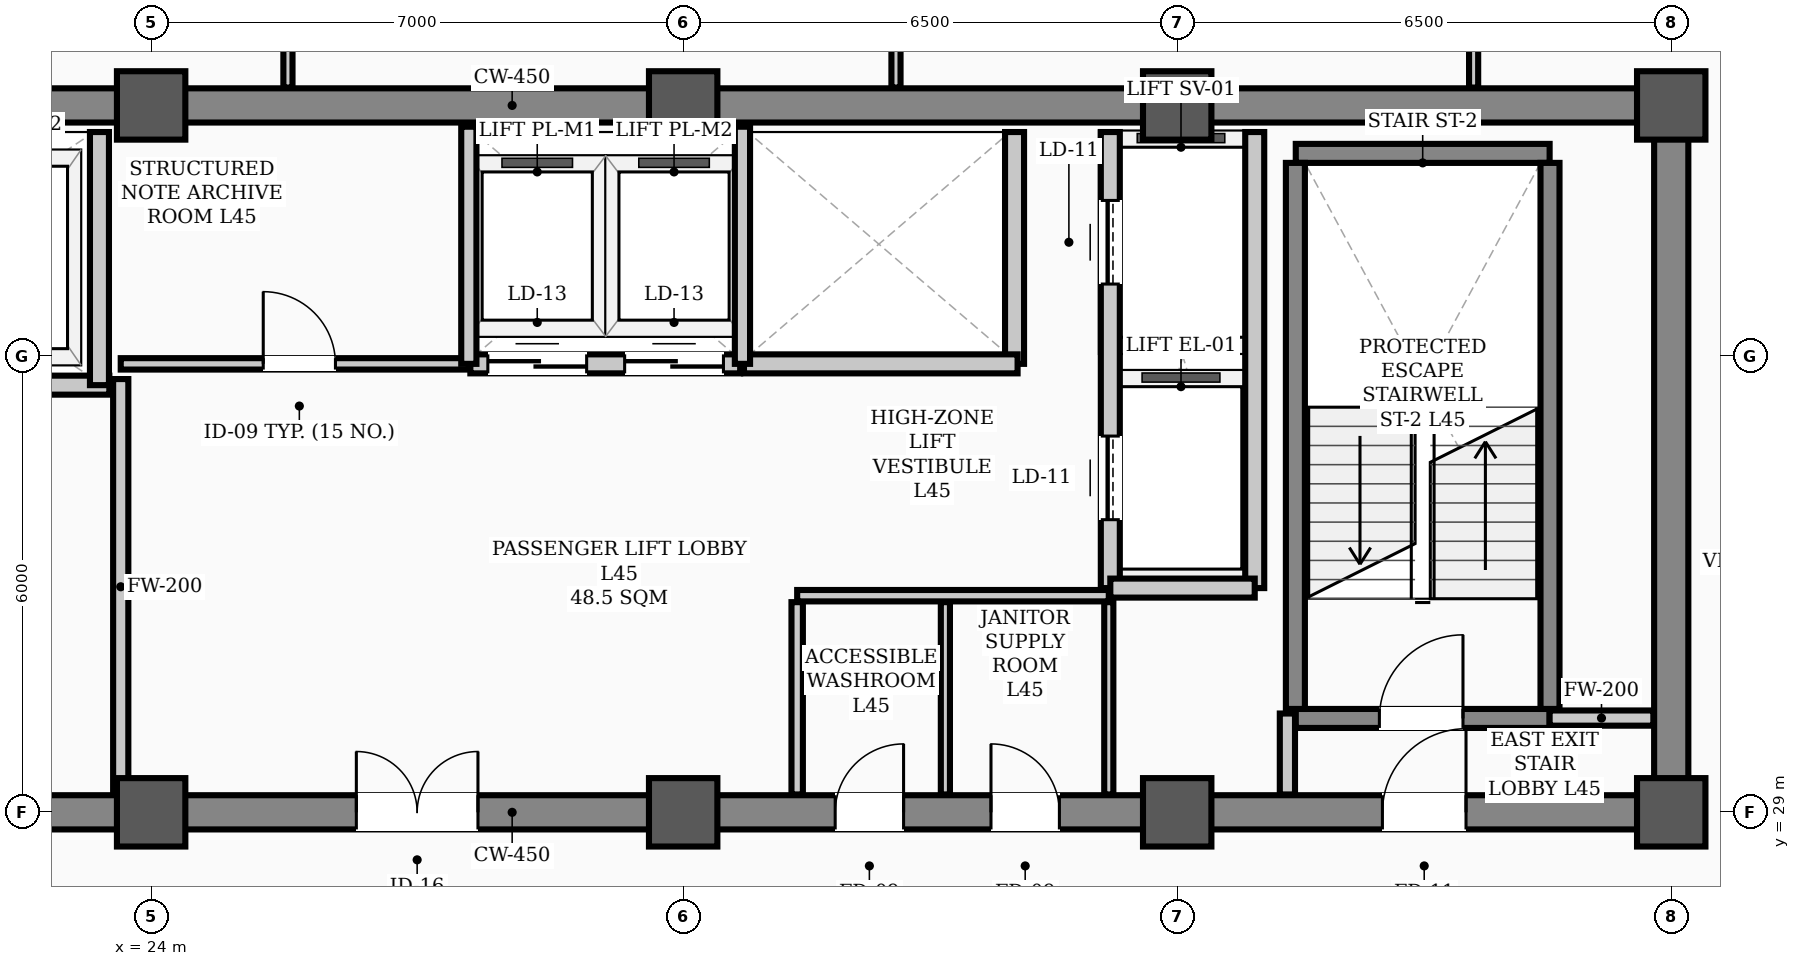
"""IFC4 building model, lengths in metres.
Left out: names, types, materials, properties, quantities, classifications, styles, units other than length and angle.
Written with IfcOpenShell. Run it as: python <this file> out.ifc"""

import sys

from ifc_helpers import new_model, si_unit, direction, frame, frame_2d, origin, origin_2d, place, context, subcontext, project, spatial, rectangle, hollow_rectangle, extrude, element, fill, save


model = new_model("IFC4")
c1 = context("Model", 3, precision=1e-05, world=origin(), true_north=direction((0.0, 1.0)))
c2 = subcontext(c1, "Body", "Model", "MODEL_VIEW")
j1 = project(units=[si_unit("LENGTHUNIT", "METRE"), si_unit("PLANEANGLEUNIT", "RADIAN")], contexts=[c1])
p1 = place(None, origin())
s1 = spatial("IfcSite", under=j1, at=p1, CompositionType="ELEMENT")
p2 = place(p1, origin())
s2 = spatial("IfcBuilding", under=s1, at=p2, CompositionType="ELEMENT")
p3 = place(p2, frame((0.0, 0.0, 181.2)))
s3 = spatial("IfcBuildingStorey", under=s2, at=p3, CompositionType="ELEMENT", Elevation=181.2)
for number, where, z_axis, x_axis in (
    (1, (24.0, 29.0, 0.0), (0.0, 0.0, 1.0), (1.0, 0.0, 0.0)),
    (2, (24.0, 38.3, 0.0), (0.0, 0.0, 1.0), (1.0, 0.0, 0.0)),
    (3, (31.0, 29.0, 0.0), (0.0, 0.0, 1.0), (1.0, 0.0, 0.0)),
    (4, (31.0, 38.3, 0.0), (0.0, 0.0, 1.0), (1.0, 0.0, 0.0)),
    (5, (37.5, 29.0, 0.0), (0.0, 0.0, 1.0), (1.0, 0.0, 0.0)),
    (6, (37.5, 38.3, 0.0), (0.0, 0.0, 1.0), (1.0, 0.0, 0.0)),
    (7, (44.0, 29.0, 0.0), (0.0, 0.0, 1.0), (1.0, 0.0, 0.0)),
    (8, (44.0, 38.3, 0.0), (0.0, 0.0, 1.0), (1.0, 0.0, 0.0)),
):
    element("IfcColumn", number, at=place(p3, frame(where, z_axis=z_axis, x_axis=x_axis)), inside=s3, PredefinedType="COLUMN", context=c2, shape_type="SweptSolid", body=[
        extrude(hollow_rectangle(XDim=0.9, YDim=0.9, WallThickness=0.035, InnerFilletRadius=0.017, OuterFilletRadius=0.052, at=origin_2d()), origin(), (0.0, 0.0, 1.0), 3.9),
    ])
p4 = place(p3, frame((13.5, 29.0, 0.0), z_axis=(0.0, 0.0, 1.0), x_axis=(1.0, 0.0, 0.0)))
e9 = element("IfcWall", 9, at=p4, inside=s3, PredefinedType="SHEAR", context=c2, shape_type="SweptSolid", body=[
    extrude(rectangle(XDim=30.5, YDim=0.45, at=frame_2d((15.25, 0.0))), origin(), (0.0, 0.0, 1.0), 3.72),
])
p5 = place(p4, frame((1.75, 0.0, 0.0)))
e10 = element("IfcOpeningElement", 10, at=p5, cuts=e9, PredefinedType="OPENING", context=c2, shape_type="SweptSolid", body=[
    extrude(rectangle(XDim=1.1, YDim=2.08, at=frame_2d((0.55, 1.04))), frame((0.0, 0.235, 0.0), z_axis=(0.0, -1.0, 0.0), x_axis=(1.0, 0.0, 0.0)), (0.0, 0.0, 1.0), 0.47),
])
p6 = place(p4, frame((26.7, 0.0, 0.0)))
e11 = element("IfcOpeningElement", 11, at=p6, cuts=e9, PredefinedType="OPENING", context=c2, shape_type="SweptSolid", body=[
    extrude(rectangle(XDim=1.1, YDim=2.08, at=frame_2d((0.55, 1.04))), frame((0.0, 0.235, 0.0), z_axis=(0.0, -1.0, 0.0), x_axis=(1.0, 0.0, 0.0)), (0.0, 0.0, 1.0), 0.47),
])
p7 = place(p4, frame((6.8, 0.0, 0.0)))
e12 = element("IfcOpeningElement", 12, at=p7, cuts=e9, PredefinedType="OPENING", context=c2, shape_type="SweptSolid", body=[
    extrude(rectangle(XDim=1.1, YDim=2.08, at=frame_2d((0.55, 1.04))), frame((0.0, 0.235, 0.0), z_axis=(0.0, -1.0, 0.0), x_axis=(1.0, 0.0, 0.0)), (0.0, 0.0, 1.0), 0.47),
])
p8 = place(p4, frame((13.2, 0.0, 0.0)))
e13 = element("IfcOpeningElement", 13, at=p8, cuts=e9, PredefinedType="OPENING", context=c2, shape_type="SweptSolid", body=[
    extrude(rectangle(XDim=1.6, YDim=2.08, at=frame_2d((0.8, 1.04))), frame((0.0, 0.235, 0.0), z_axis=(0.0, -1.0, 0.0), x_axis=(1.0, 0.0, 0.0)), (0.0, 0.0, 1.0), 0.47),
])
p9 = place(p4, frame((19.5, 0.0, 0.0)))
e14 = element("IfcOpeningElement", 14, at=p9, cuts=e9, PredefinedType="OPENING", context=c2, shape_type="SweptSolid", body=[
    extrude(rectangle(XDim=0.9, YDim=2.08, at=frame_2d((0.45, 1.04))), frame((0.0, 0.235, 0.0), z_axis=(0.0, -1.0, 0.0), x_axis=(1.0, 0.0, 0.0)), (0.0, 0.0, 1.0), 0.47),
])
p10 = place(p4, frame((21.55, 0.0, 0.0)))
e15 = element("IfcOpeningElement", 15, at=p10, cuts=e9, PredefinedType="OPENING", context=c2, shape_type="SweptSolid", body=[
    extrude(rectangle(XDim=0.9, YDim=2.08, at=frame_2d((0.45, 1.04))), frame((0.0, 0.235, 0.0), z_axis=(0.0, -1.0, 0.0), x_axis=(1.0, 0.0, 0.0)), (0.0, 0.0, 1.0), 0.47),
])
p11 = place(p3, frame((13.5, 38.3, 0.0), z_axis=(0.0, 0.0, 1.0), x_axis=(1.0, 0.0, 0.0)))
e16 = element("IfcWall", 16, at=p11, inside=s3, PredefinedType="SHEAR", context=c2, shape_type="SweptSolid", body=[
    extrude(rectangle(XDim=30.5, YDim=0.45, at=frame_2d((15.25, 0.0))), origin(), (0.0, 0.0, 1.0), 3.72),
])
p12 = place(p3, frame((44.0, 29.35, 0.0), z_axis=(0.0, 0.0, 1.0), x_axis=(0.0, 1.0, 0.0)))
e17 = element("IfcWall", 17, at=p12, inside=s3, PredefinedType="SHEAR", context=c2, shape_type="SweptSolid", body=[
    extrude(rectangle(XDim=8.6, YDim=0.45, at=frame_2d((4.3, 0.0))), origin(), (0.0, 0.0, 1.0), 3.72),
])
p13 = place(p3, frame((39.06, 30.235, 0.0), z_axis=(0.0, 0.0, 1.0), x_axis=(1.0, 0.0, 0.0)))
e18 = element("IfcWall", 18, at=p13, inside=s3, PredefinedType="STANDARD", context=c2, shape_type="SweptSolid", body=[
    extrude(rectangle(XDim=3.34, YDim=0.25, at=frame_2d((1.67, 0.0))), origin(), (0.0, 0.0, 1.0), 3.72),
])
p14 = place(p13, frame((1.1, 0.0, 0.0)))
e19 = element("IfcOpeningElement", 19, at=p14, cuts=e18, PredefinedType="OPENING", context=c2, shape_type="SweptSolid", body=[
    extrude(rectangle(XDim=1.1, YDim=2.08, at=frame_2d((0.55, 1.04))), frame((0.0, 0.135, 0.0), z_axis=(0.0, -1.0, 0.0), x_axis=(1.0, 0.0, 0.0)), (0.0, 0.0, 1.0), 0.27),
])
p15 = place(p3, frame((39.06, 37.669, 0.0), z_axis=(0.0, 0.0, 1.0), x_axis=(1.0, 0.0, 0.0)))
e20 = element("IfcWall", 20, at=p15, inside=s3, PredefinedType="STANDARD", context=c2, shape_type="SweptSolid", body=[
    extrude(rectangle(XDim=3.34, YDim=0.25, at=frame_2d((1.67, 0.0))), origin(), (0.0, 0.0, 1.0), 3.72),
])
for number, where, z_axis, x_axis in (
    (21, (39.055, 30.36, 0.0), (0.0, 0.0, 1.0), (0.0, 1.0, 0.0)),
    (22, (42.405, 30.36, 0.0), (0.0, 0.0, 1.0), (0.0, 1.0, 0.0)),
):
    element("IfcWall", number, at=place(p3, frame(where, z_axis=z_axis, x_axis=x_axis)), inside=s3, PredefinedType="STANDARD", context=c2, shape_type="SweptSolid", body=[
        extrude(rectangle(XDim=7.184, YDim=0.25, at=frame_2d((3.592, 0.0))), origin(), (0.0, 0.0, 1.0), 3.72),
    ])
p16 = place(p3, frame((18.1, 34.62, 0.0), z_axis=(0.0, 0.0, 1.0), x_axis=(1.0, 0.0, 0.0)))
e23 = element("IfcWall", 23, at=p16, inside=s3, PredefinedType="STANDARD", context=c2, shape_type="SweptSolid", body=[
    extrude(rectangle(XDim=5.35, YDim=0.25, at=frame_2d((2.675, 0.0))), origin(), (0.0, 0.0, 1.0), 3.72),
])
p17 = place(p16, frame((0.85, 0.0, 0.0)))
e24 = element("IfcOpeningElement", 24, at=p17, cuts=e23, PredefinedType="OPENING", context=c2, shape_type="SweptSolid", body=[
    extrude(rectangle(XDim=1.1, YDim=2.08, at=frame_2d((0.55, 1.04))), frame((0.0, 0.135, 0.0), z_axis=(0.0, -1.0, 0.0), x_axis=(1.0, 0.0, 0.0)), (0.0, 0.0, 1.0), 0.27),
])
p18 = place(p16, frame((3.45, 0.0, 0.0)))
e25 = element("IfcOpeningElement", 25, at=p18, cuts=e23, PredefinedType="OPENING", context=c2, shape_type="SweptSolid", body=[
    extrude(rectangle(XDim=1.1, YDim=2.08, at=frame_2d((0.55, 1.04))), frame((0.0, 0.135, 0.0), z_axis=(0.0, -1.0, 0.0), x_axis=(1.0, 0.0, 0.0)), (0.0, 0.0, 1.0), 0.27),
])
p19 = place(p3, frame((36.62, 31.95, 0.0), z_axis=(0.0, 0.0, 1.0), x_axis=(0.0, 1.0, 0.0)))
e26 = element("IfcWall", 26, at=p19, inside=s3, PredefinedType="STANDARD", context=c2, shape_type="SweptSolid", body=[
    extrude(rectangle(XDim=6.0, YDim=0.25, at=frame_2d((3.0, 0.0))), origin(), (0.0, 0.0, 1.0), 3.35),
])
p20 = place(p19, frame((0.9, 0.0, 0.0)))
e27 = element("IfcOpeningElement", 27, at=p20, cuts=e26, PredefinedType="OPENING", context=c2, shape_type="SweptSolid", body=[
    extrude(rectangle(XDim=1.1, YDim=2.08, at=frame_2d((0.55, 1.04))), frame((0.0, 0.135, 0.0), z_axis=(0.0, -1.0, 0.0), x_axis=(1.0, 0.0, 0.0)), (0.0, 0.0, 1.0), 0.27),
])
p21 = place(p19, frame((4.0, 0.0, 0.0)))
e28 = element("IfcOpeningElement", 28, at=p21, cuts=e26, PredefinedType="OPENING", context=c2, shape_type="SweptSolid", body=[
    extrude(rectangle(XDim=1.1, YDim=2.08, at=frame_2d((0.55, 1.04))), frame((0.0, 0.135, 0.0), z_axis=(0.0, -1.0, 0.0), x_axis=(1.0, 0.0, 0.0)), (0.0, 0.0, 1.0), 0.27),
])
p22 = place(p3, frame((38.52, 31.95, 0.0), z_axis=(0.0, 0.0, 1.0), x_axis=(0.0, 1.0, 0.0)))
e29 = element("IfcWall", 29, at=p22, inside=s3, PredefinedType="STANDARD", context=c2, shape_type="SweptSolid", body=[
    extrude(rectangle(XDim=6.0, YDim=0.25, at=frame_2d((3.0, 0.0))), origin(), (0.0, 0.0, 1.0), 3.35),
])
p23 = place(p3, frame((36.62, 31.95, 0.0), z_axis=(0.0, 0.0, 1.0), x_axis=(1.0, 0.0, 0.0)))
e30 = element("IfcWall", 30, at=p23, inside=s3, PredefinedType="STANDARD", context=c2, shape_type="SweptSolid", body=[
    extrude(rectangle(XDim=1.9, YDim=0.25, at=frame_2d((0.95, 0.0))), origin(), (0.0, 0.0, 1.0), 3.48),
])
p24 = place(p3, frame((23.32, 34.62, 0.0), z_axis=(0.0, 0.0, 1.0), x_axis=(0.0, 1.0, 0.0)))
e31 = element("IfcWall", 31, at=p24, inside=s3, PredefinedType="STANDARD", context=c2, shape_type="SweptSolid", body=[
    extrude(rectangle(XDim=3.33, YDim=0.25, at=frame_2d((1.665, 0.0))), origin(), (0.0, 0.0, 1.0), 3.35),
])
p25 = place(p3, frame((35.36, 34.9, 0.0), z_axis=(0.0, 0.0, 1.0), x_axis=(0.0, 1.0, 0.0)))
e32 = element("IfcWall", 32, at=p25, inside=s3, PredefinedType="STANDARD", context=c2, shape_type="SweptSolid", body=[
    extrude(rectangle(XDim=3.05, YDim=0.25, at=frame_2d((1.525, 0.0))), origin(), (0.0, 0.0, 1.0), 3.35),
])
p26 = place(p3, frame((28.2, 34.9, 0.0), z_axis=(0.0, 0.0, 1.0), x_axis=(1.0, 0.0, 0.0)))
e33 = element("IfcWall", 33, at=p26, inside=s3, PredefinedType="STANDARD", context=c2, shape_type="SweptSolid", body=[
    extrude(rectangle(XDim=3.55, YDim=0.25, at=frame_2d((1.775, 0.0))), origin(), (0.0, 0.0, 1.0), 3.72),
])
p27 = place(p26, frame((0.23, 0.0, 0.0)))
e34 = element("IfcOpeningElement", 34, at=p27, cuts=e33, PredefinedType="OPENING", context=c2, shape_type="SweptSolid", body=[
    extrude(rectangle(XDim=1.3, YDim=2.08, at=frame_2d((0.65, 1.04))), frame((0.0, 0.135, 0.0), z_axis=(0.0, -1.0, 0.0), x_axis=(1.0, 0.0, 0.0)), (0.0, 0.0, 1.0), 0.27),
])
p28 = place(p26, frame((2.03, 0.0, 0.0)))
e35 = element("IfcOpeningElement", 35, at=p28, cuts=e33, PredefinedType="OPENING", context=c2, shape_type="SweptSolid", body=[
    extrude(rectangle(XDim=1.3, YDim=2.08, at=frame_2d((0.65, 1.04))), frame((0.0, 0.135, 0.0), z_axis=(0.0, -1.0, 0.0), x_axis=(1.0, 0.0, 0.0)), (0.0, 0.0, 1.0), 0.27),
])
p29 = place(p3, frame((31.8, 34.9, 0.0), z_axis=(0.0, 0.0, 1.0), x_axis=(1.0, 0.0, 0.0)))
e36 = element("IfcWall", 36, at=p29, inside=s3, PredefinedType="STANDARD", context=c2, shape_type="SweptSolid", body=[
    extrude(rectangle(XDim=3.6, YDim=0.25, at=frame_2d((1.8, 0.0))), origin(), (0.0, 0.0, 1.0), 3.72),
])
p30 = place(p3, frame((42.4, 30.24, 0.0), z_axis=(0.0, 0.0, 1.0), x_axis=(1.0, 0.0, 0.0)))
e37 = element("IfcWall", 37, at=p30, inside=s3, PredefinedType="STANDARD", context=c2, shape_type="SweptSolid", body=[
    extrude(rectangle(XDim=1.365, YDim=0.2, at=frame_2d((0.683, 0.0))), origin(), (0.0, 0.0, 1.0), 3.2),
])
p31 = place(p3, frame((23.6, 34.9, 0.0), z_axis=(0.0, 0.0, 1.0), x_axis=(1.0, 0.0, 0.0)))
e38 = element("IfcWall", 38, at=p31, inside=s3, PredefinedType="PARTITIONING", context=c2, shape_type="SweptSolid", body=[
    extrude(rectangle(XDim=4.58, YDim=0.15, at=frame_2d((2.29, 0.0))), origin(), (0.0, 0.0, 1.0), 3.72),
])
p32 = place(p31, frame((1.875, 0.0, 0.0)))
e39 = element("IfcOpeningElement", 39, at=p32, cuts=e38, PredefinedType="OPENING", context=c2, shape_type="SweptSolid", body=[
    extrude(rectangle(XDim=0.95, YDim=2.08, at=frame_2d((0.475, 1.04))), frame((0.0, 0.085, 0.0), z_axis=(0.0, -1.0, 0.0), x_axis=(1.0, 0.0, 0.0)), (0.0, 0.0, 1.0), 0.17),
])
p33 = place(p3, frame((32.5, 31.85, 0.0), z_axis=(0.0, 0.0, 1.0), x_axis=(1.0, 0.0, 0.0)))
e40 = element("IfcWall", 40, at=p33, inside=s3, PredefinedType="PARTITIONING", context=c2, shape_type="SweptSolid", body=[
    extrude(rectangle(XDim=4.1, YDim=0.15, at=frame_2d((2.05, 0.0))), origin(), (0.0, 0.0, 1.0), 3.72),
])
p34 = place(p3, frame((38.95, 29.235, 0.0), z_axis=(0.0, 0.0, 1.0), x_axis=(0.0, 1.0, 0.0)))
e41 = element("IfcWall", 41, at=p34, inside=s3, PredefinedType="STANDARD", context=c2, shape_type="SweptSolid", body=[
    extrude(rectangle(XDim=1.065, YDim=0.2, at=frame_2d((0.532, 0.0))), origin(), (0.0, 0.0, 1.0), 3.35),
])
p35 = place(p3, frame((23.6, 29.235, 0.0), z_axis=(0.0, 0.0, 1.0), x_axis=(0.0, 1.0, 0.0)))
e42 = element("IfcWall", 42, at=p35, inside=s3, PredefinedType="STANDARD", context=c2, shape_type="SweptSolid", body=[
    extrude(rectangle(XDim=5.465, YDim=0.2, at=frame_2d((2.732, 0.0))), origin(), (0.0, 0.0, 1.0), 3.2),
])
p36 = place(p3, frame((32.5, 29.235, 0.0), z_axis=(0.0, 0.0, 1.0), x_axis=(0.0, 1.0, 0.0)))
e43 = element("IfcWall", 43, at=p36, inside=s3, PredefinedType="PARTITIONING", context=c2, shape_type="SweptSolid", body=[
    extrude(rectangle(XDim=2.53, YDim=0.15, at=frame_2d((1.265, 0.0))), origin(), (0.0, 0.0, 1.0), 3.35),
])
for number, where, z_axis, x_axis in (
    (44, (36.6, 29.235, 0.0), (0.0, 0.0, 1.0), (0.0, 1.0, 0.0)),
    (45, (34.45, 29.235, 0.0), (0.0, 0.0, 1.0), (0.0, 1.0, 0.0)),
):
    element("IfcWall", number, at=place(p3, frame(where, z_axis=z_axis, x_axis=x_axis)), inside=s3, PredefinedType="PARTITIONING", context=c2, shape_type="SweptSolid", body=[
        extrude(rectangle(XDim=2.53, YDim=0.12, at=frame_2d((1.265, 0.0))), origin(), (0.0, 0.0, 1.0), 3.35),
    ])
p37 = place(p3, frame((25.8, 38.535, 0.0), z_axis=(0.0, 0.0, 1.0), x_axis=(0.0, 1.0, 0.0)))
e46 = element("IfcWall", 46, at=p37, inside=s3, PredefinedType="PARTITIONING", context=c2, shape_type="SweptSolid", body=[
    extrude(rectangle(XDim=6.405, YDim=0.12, at=frame_2d((3.203, 0.0))), origin(), (0.0, 0.0, 1.0), 3.212),
])
p38 = place(p37, frame((3.485, 0.0, 0.0)))
e47 = element("IfcOpeningElement", 47, at=p38, cuts=e46, PredefinedType="OPENING", context=c2, shape_type="SweptSolid", body=[
    extrude(rectangle(XDim=0.95, YDim=2.08, at=frame_2d((0.475, 1.04))), frame((0.0, 0.07, 0.0), z_axis=(0.0, -1.0, 0.0), x_axis=(1.0, 0.0, 0.0)), (0.0, 0.0, 1.0), 0.14),
])
p39 = place(p3, frame((33.8, 38.535, 0.0), z_axis=(0.0, 0.0, 1.0), x_axis=(0.0, 1.0, 0.0)))
e48 = element("IfcWall", 48, at=p39, inside=s3, PredefinedType="PARTITIONING", context=c2, shape_type="SweptSolid", body=[
    extrude(rectangle(XDim=6.405, YDim=0.12, at=frame_2d((3.203, 0.0))), origin(), (0.0, 0.0, 1.0), 3.212),
])
p40 = place(p39, frame((3.485, 0.0, 0.0)))
e49 = element("IfcOpeningElement", 49, at=p40, cuts=e48, PredefinedType="OPENING", context=c2, shape_type="SweptSolid", body=[
    extrude(rectangle(XDim=0.95, YDim=2.08, at=frame_2d((0.475, 1.04))), frame((0.0, 0.07, 0.0), z_axis=(0.0, -1.0, 0.0), x_axis=(1.0, 0.0, 0.0)), (0.0, 0.0, 1.0), 0.14),
])
p41 = place(p3, frame((41.4, 38.535, 0.0), z_axis=(0.0, 0.0, 1.0), x_axis=(0.0, 1.0, 0.0)))
e50 = element("IfcWall", 50, at=p41, inside=s3, PredefinedType="PARTITIONING", context=c2, shape_type="SweptSolid", body=[
    extrude(rectangle(XDim=6.405, YDim=0.12, at=frame_2d((3.203, 0.0))), origin(), (0.0, 0.0, 1.0), 3.212),
])
p42 = place(p41, frame((3.485, 0.0, 0.0)))
e51 = element("IfcOpeningElement", 51, at=p42, cuts=e50, PredefinedType="OPENING", context=c2, shape_type="SweptSolid", body=[
    extrude(rectangle(XDim=0.95, YDim=2.08, at=frame_2d((0.475, 1.04))), frame((0.0, 0.07, 0.0), z_axis=(0.0, -1.0, 0.0), x_axis=(1.0, 0.0, 0.0)), (0.0, 0.0, 1.0), 0.14),
])
for number, where, z_axis, x_axis in (
    (52, (28.18, 34.9, 0.0), (0.0, 0.0, 1.0), (0.0, 1.0, 0.0)),
    (53, (31.78, 34.9, 0.0), (0.0, 0.0, 1.0), (0.0, 1.0, 0.0)),
):
    element("IfcWall", number, at=place(p3, frame(where, z_axis=z_axis, x_axis=x_axis)), inside=s3, PredefinedType="STANDARD", context=c2, shape_type="SweptSolid", body=[
        extrude(rectangle(XDim=3.12, YDim=0.2, at=frame_2d((1.56, 0.0))), origin(), (0.0, 0.0, 1.0), 3.35),
    ])
p43 = place(p14, origin())
e54 = element("IfcDoor", 54, at=p43, inside=s3, OperationType="SINGLE_SWING_RIGHT", PredefinedType="DOOR", context=c2, shape_type="SweptSolid", body=[
    extrude(rectangle(XDim=1.1, YDim=2.08, at=frame_2d((0.55, 1.04))), frame((0.0, 0.025, 0.0), z_axis=(0.0, -1.0, 0.0), x_axis=(1.0, 0.0, 0.0)), (0.0, 0.0, 1.0), 0.05),
])
fill(e19, e54)
p44 = place(p6, origin())
e55 = element("IfcDoor", 55, at=p44, inside=s3, OperationType="SINGLE_SWING_RIGHT", PredefinedType="DOOR", context=c2, shape_type="SweptSolid", body=[
    extrude(rectangle(XDim=1.1, YDim=2.08, at=frame_2d((0.55, 1.04))), frame((0.0, 0.025, 0.0), z_axis=(0.0, -1.0, 0.0), x_axis=(1.0, 0.0, 0.0)), (0.0, 0.0, 1.0), 0.05),
])
fill(e11, e55)
p45 = place(p8, origin())
e56 = element("IfcDoor", 56, at=p45, inside=s3, OperationType="DOUBLE_DOOR_SINGLE_SWING", PredefinedType="DOOR", context=c2, shape_type="SweptSolid", body=[
    extrude(rectangle(XDim=1.6, YDim=2.08, at=frame_2d((0.8, 1.04))), frame((0.0, 0.025, 0.0), z_axis=(0.0, -1.0, 0.0), x_axis=(1.0, 0.0, 0.0)), (0.0, 0.0, 1.0), 0.05),
])
fill(e13, e56)
p46 = place(p32, origin())
e57 = element("IfcDoor", 57, at=p46, inside=s3, OperationType="SINGLE_SWING_LEFT", PredefinedType="DOOR", context=c2, shape_type="SweptSolid", body=[
    extrude(rectangle(XDim=0.95, YDim=2.08, at=frame_2d((0.475, 1.04))), frame((0.0, 0.025, 0.0), z_axis=(0.0, -1.0, 0.0), x_axis=(1.0, 0.0, 0.0)), (0.0, 0.0, 1.0), 0.05),
])
fill(e39, e57)
p47 = place(p9, origin())
e58 = element("IfcDoor", 58, at=p47, inside=s3, OperationType="SINGLE_SWING_RIGHT", PredefinedType="DOOR", context=c2, shape_type="SweptSolid", body=[
    extrude(rectangle(XDim=0.9, YDim=2.08, at=frame_2d((0.45, 1.04))), frame((0.0, 0.025, 0.0), z_axis=(0.0, -1.0, 0.0), x_axis=(1.0, 0.0, 0.0)), (0.0, 0.0, 1.0), 0.05),
])
fill(e14, e58)
p48 = place(p10, origin())
e59 = element("IfcDoor", 59, at=p48, inside=s3, OperationType="SINGLE_SWING_LEFT", PredefinedType="DOOR", context=c2, shape_type="SweptSolid", body=[
    extrude(rectangle(XDim=0.9, YDim=2.08, at=frame_2d((0.45, 1.04))), frame((0.0, 0.025, 0.0), z_axis=(0.0, -1.0, 0.0), x_axis=(1.0, 0.0, 0.0)), (0.0, 0.0, 1.0), 0.05),
])
fill(e15, e59)
p49 = place(p20, origin())
e60 = element("IfcDoor", 60, at=p49, inside=s3, OperationType="SLIDING_TO_LEFT", PredefinedType="DOOR", context=c2, shape_type="SweptSolid", body=[
    extrude(rectangle(XDim=1.1, YDim=2.08, at=frame_2d((0.55, 1.04))), frame((0.0, 0.025, 0.0), z_axis=(0.0, -1.0, 0.0), x_axis=(1.0, 0.0, 0.0)), (0.0, 0.0, 1.0), 0.05),
])
fill(e27, e60)
p50 = place(p21, origin())
e61 = element("IfcDoor", 61, at=p50, inside=s3, OperationType="SLIDING_TO_LEFT", PredefinedType="DOOR", context=c2, shape_type="SweptSolid", body=[
    extrude(rectangle(XDim=1.1, YDim=2.08, at=frame_2d((0.55, 1.04))), frame((0.0, 0.025, 0.0), z_axis=(0.0, -1.0, 0.0), x_axis=(1.0, 0.0, 0.0)), (0.0, 0.0, 1.0), 0.05),
])
fill(e28, e61)
p51 = place(p27, origin())
e62 = element("IfcDoor", 62, at=p51, inside=s3, OperationType="DOUBLE_DOOR_SLIDING", PredefinedType="DOOR", context=c2, shape_type="SweptSolid", body=[
    extrude(rectangle(XDim=1.3, YDim=2.08, at=frame_2d((0.65, 1.04))), frame((0.0, 0.025, 0.0), z_axis=(0.0, -1.0, 0.0), x_axis=(1.0, 0.0, 0.0)), (0.0, 0.0, 1.0), 0.05),
])
fill(e34, e62)
p52 = place(p28, origin())
e63 = element("IfcDoor", 63, at=p52, inside=s3, OperationType="DOUBLE_DOOR_SLIDING", PredefinedType="DOOR", context=c2, shape_type="SweptSolid", body=[
    extrude(rectangle(XDim=1.3, YDim=2.08, at=frame_2d((0.65, 1.04))), frame((0.0, 0.025, 0.0), z_axis=(0.0, -1.0, 0.0), x_axis=(1.0, 0.0, 0.0)), (0.0, 0.0, 1.0), 0.05),
])
fill(e35, e63)
save(model, sys.argv[1])
